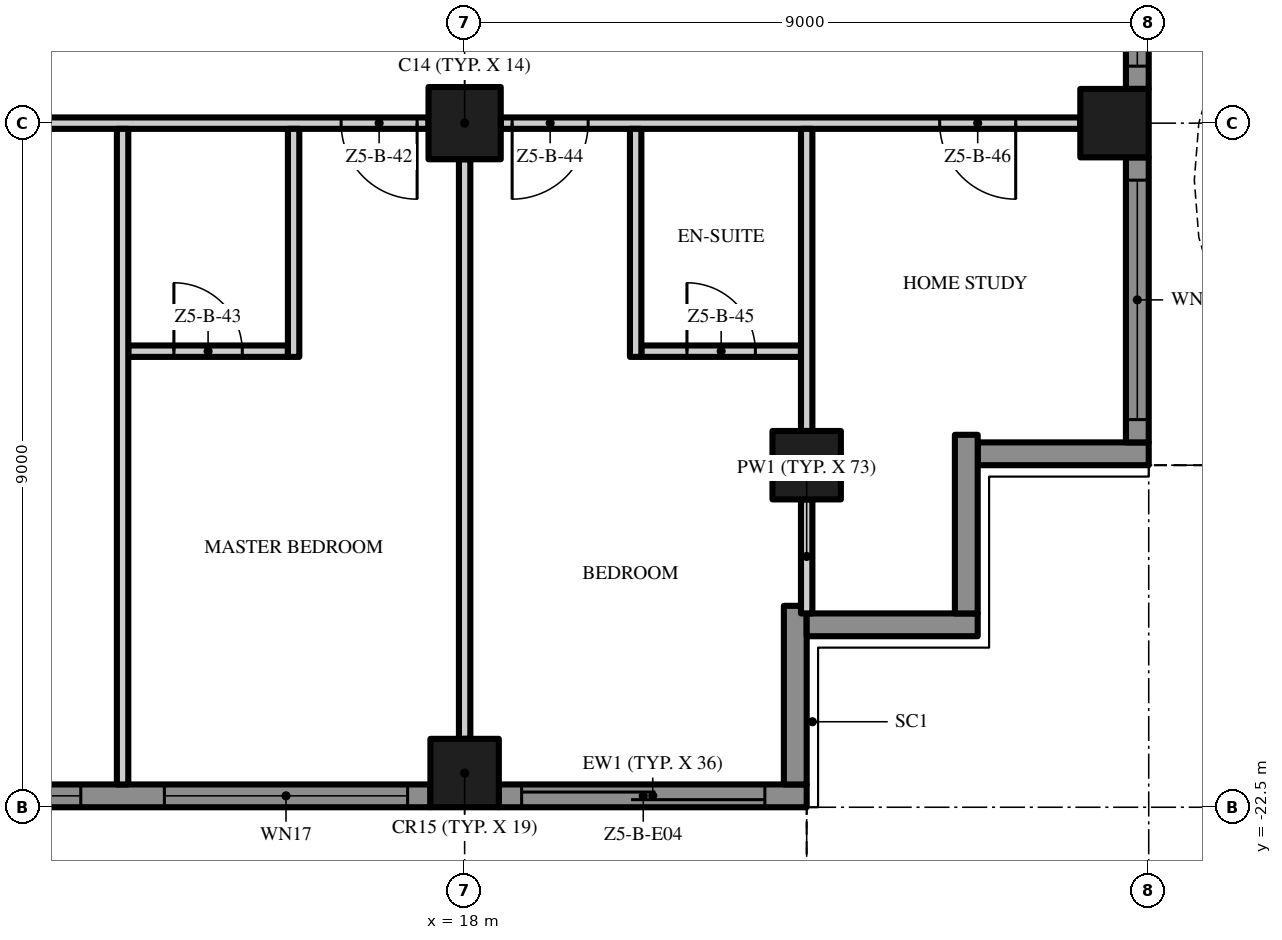
"""IFC4 building model, lengths in metres.
Left out: names, types, materials, properties, quantities, classifications, styles, units other than length and angle.
Written with IfcOpenShell. Run it as: python <this file> out.ifc"""

import sys

from ifc_helpers import new_model, si_unit, direction, frame, frame_2d, origin, origin_2d, place, context, subcontext, project, spatial, polyline, rectangle, outline, extrude, element, fill, save


model = new_model("IFC4")
c1 = context("Model", 3, precision=1e-05, world=origin(), true_north=direction((0.0, 1.0)))
c2 = subcontext(c1, "Body", "Model", "MODEL_VIEW")
j1 = project(units=[si_unit("LENGTHUNIT", "METRE"), si_unit("PLANEANGLEUNIT", "RADIAN")], contexts=[c1])
p1 = place(None, origin())
s1 = spatial("IfcSite", under=j1, at=p1, CompositionType="ELEMENT")
p2 = place(p1, origin())
s2 = spatial("IfcBuilding", under=s1, at=p2, CompositionType="ELEMENT")
p3 = place(p2, frame((0.0, 0.0, 257.8)))
s3 = spatial("IfcBuildingStorey", under=s2, at=p3, CompositionType="ELEMENT", Elevation=257.8)
p4 = place(p3, frame((18.0, -13.5, 0.0), z_axis=(0.0, 0.0, 1.0), x_axis=(1.0, 0.0, 0.0)))
e1 = element("IfcColumn", 1, at=p4, inside=s3, PredefinedType="COLUMN", context=c2, shape_type="SweptSolid", body=[
    extrude(rectangle(XDim=0.95, YDim=0.95, at=origin_2d()), origin(), (0.0, 0.0, 1.0), 3.5),
])
for number, where, z_axis, x_axis in (
    (2, (18.0, -22.05, 0.0), (0.0, 0.0, 1.0), (1.0, 0.0, 0.0)),
    (3, (26.55, -13.5, 0.0), (0.0, 0.0, 1.0), (1.0, 0.0, 0.0)),
    (4, (22.5, -18.0, 0.0), (0.0, 0.0, 1.0), (1.0, 0.0, 0.0)),
):
    element("IfcColumn", number, at=place(p3, frame(where, z_axis=z_axis, x_axis=x_axis)), inside=s3, PredefinedType="COLUMN", context=c2, shape_type="SweptSolid", body=[
        extrude(rectangle(XDim=0.9, YDim=0.9, at=origin_2d()), origin(), (0.0, 0.0, 1.0), 3.5),
    ])
p5 = place(p3, frame((17.55, -22.35, 0.0), z_axis=(0.0, 0.0, 1.0), x_axis=(-1.0, 0.0, 0.0)))
e5 = element("IfcWall", 5, at=p5, inside=s3, PredefinedType="SOLIDWALL", context=c2, shape_type="SweptSolid", body=[
    extrude(rectangle(XDim=8.1, YDim=0.3, at=frame_2d((4.05, 0.0))), origin(), (0.0, 0.0, 1.0), 3.5),
])
p6 = place(p5, frame((4.6, 0.0, 0.45)))
e6 = element("IfcOpeningElement", 6, at=p6, cuts=e5, PredefinedType="OPENING", context=c2, shape_type="SweptSolid", body=[
    extrude(rectangle(XDim=3.2, YDim=2.65, at=frame_2d((1.6, 1.325))), frame((0.0, 0.16, 0.0), z_axis=(0.0, -1.0, 0.0), x_axis=(1.0, 0.0, 0.0)), (0.0, 0.0, 1.0), 0.32),
])
p7 = place(p5, frame((0.3, 0.0, 0.45)))
e7 = element("IfcOpeningElement", 7, at=p7, cuts=e5, PredefinedType="OPENING", context=c2, shape_type="SweptSolid", body=[
    extrude(rectangle(XDim=3.2, YDim=2.65, at=frame_2d((1.6, 1.325))), frame((0.0, 0.16, 0.0), z_axis=(0.0, -1.0, 0.0), x_axis=(1.0, 0.0, 0.0)), (0.0, 0.0, 1.0), 0.32),
])
p8 = place(p3, frame((22.5, -22.35, 0.0), z_axis=(0.0, 0.0, 1.0), x_axis=(-1.0, 0.0, 0.0)))
e8 = element("IfcWall", 8, at=p8, inside=s3, PredefinedType="SOLIDWALL", context=c2, shape_type="SweptSolid", body=[
    extrude(rectangle(XDim=4.05, YDim=0.3, at=frame_2d((2.025, 0.0))), origin(), (0.0, 0.0, 1.0), 3.5),
])
p9 = place(p8, frame((0.55, 0.0, 0.0)))
e9 = element("IfcOpeningElement", 9, at=p9, cuts=e8, PredefinedType="OPENING", context=c2, shape_type="SweptSolid", body=[
    extrude(rectangle(XDim=3.2, YDim=2.4, at=frame_2d((1.6, 1.2))), frame((0.0, 0.16, 0.0), z_axis=(0.0, -1.0, 0.0), x_axis=(1.0, 0.0, 0.0)), (0.0, 0.0, 1.0), 0.32),
])
p10 = place(p3, frame((22.35, -19.85, 0.0), z_axis=(0.0, 0.0, 1.0), x_axis=(0.0, -1.0, 0.0)))
e10 = element("IfcWall", 10, at=p10, inside=s3, PredefinedType="SOLIDWALL", context=c2, shape_type="SweptSolid", body=[
    extrude(rectangle(XDim=2.35, YDim=0.3, at=frame_2d((1.175, 0.0))), origin(), (0.0, 0.0, 1.0), 3.5),
])
p11 = place(p3, frame((24.75, -20.1, 0.0), z_axis=(0.0, 0.0, 1.0), x_axis=(-1.0, 0.0, 0.0)))
e11 = element("IfcWall", 11, at=p11, inside=s3, PredefinedType="SOLIDWALL", context=c2, shape_type="SweptSolid", body=[
    extrude(rectangle(XDim=2.25, YDim=0.3, at=frame_2d((1.125, 0.0))), origin(), (0.0, 0.0, 1.0), 3.5),
])
p12 = place(p3, frame((24.6, -17.6, 0.0), z_axis=(0.0, 0.0, 1.0), x_axis=(0.0, -1.0, 0.0)))
e12 = element("IfcWall", 12, at=p12, inside=s3, PredefinedType="SOLIDWALL", context=c2, shape_type="SweptSolid", body=[
    extrude(rectangle(XDim=2.35, YDim=0.3, at=frame_2d((1.175, 0.0))), origin(), (0.0, 0.0, 1.0), 3.5),
])
p13 = place(p3, frame((27.0, -17.85, 0.0), z_axis=(0.0, 0.0, 1.0), x_axis=(-1.0, 0.0, 0.0)))
e13 = element("IfcWall", 13, at=p13, inside=s3, PredefinedType="SOLIDWALL", context=c2, shape_type="SweptSolid", body=[
    extrude(rectangle(XDim=2.25, YDim=0.3, at=frame_2d((1.125, 0.0))), origin(), (0.0, 0.0, 1.0), 3.5),
])
p14 = place(p3, frame((26.85, -13.95, 0.0), z_axis=(0.0, 0.0, 1.0), x_axis=(0.0, -1.0, 0.0)))
e14 = element("IfcWall", 14, at=p14, inside=s3, PredefinedType="SOLIDWALL", context=c2, shape_type="SweptSolid", body=[
    extrude(rectangle(XDim=3.75, YDim=0.3, at=frame_2d((1.875, 0.0))), origin(), (0.0, 0.0, 1.0), 3.5),
])
p15 = place(p14, frame((0.3, 0.0, 0.45)))
e15 = element("IfcOpeningElement", 15, at=p15, cuts=e14, PredefinedType="OPENING", context=c2, shape_type="SweptSolid", body=[
    extrude(rectangle(XDim=3.15, YDim=2.65, at=frame_2d((1.575, 1.325))), frame((0.0, 0.16, 0.0), z_axis=(0.0, -1.0, 0.0), x_axis=(1.0, 0.0, 0.0)), (0.0, 0.0, 1.0), 0.32),
])
p16 = place(p3, frame((26.85, -4.95, 0.0), z_axis=(0.0, 0.0, 1.0), x_axis=(0.0, -1.0, 0.0)))
e16 = element("IfcWall", 16, at=p16, inside=s3, PredefinedType="SOLIDWALL", context=c2, shape_type="SweptSolid", body=[
    extrude(rectangle(XDim=8.1, YDim=0.3, at=frame_2d((4.05, 0.0))), origin(), (0.0, 0.0, 1.0), 3.5),
])
p17 = place(p16, frame((4.6, 0.0, 0.45)))
e17 = element("IfcOpeningElement", 17, at=p17, cuts=e16, PredefinedType="OPENING", context=c2, shape_type="SweptSolid", body=[
    extrude(rectangle(XDim=3.2, YDim=2.65, at=frame_2d((1.6, 1.325))), frame((0.0, 0.16, 0.0), z_axis=(0.0, -1.0, 0.0), x_axis=(1.0, 0.0, 0.0)), (0.0, 0.0, 1.0), 0.32),
])
p18 = place(p16, frame((0.3, 0.0, 0.0)))
e18 = element("IfcOpeningElement", 18, at=p18, cuts=e16, PredefinedType="OPENING", context=c2, shape_type="SweptSolid", body=[
    extrude(rectangle(XDim=3.2, YDim=2.4, at=frame_2d((1.6, 1.2))), frame((0.0, 0.16, 0.0), z_axis=(0.0, -1.0, 0.0), x_axis=(1.0, 0.0, 0.0)), (0.0, 0.0, 1.0), 0.32),
])
p19 = place(p3, origin())
e19 = element("IfcWall", 19, at=p19, inside=s3, PredefinedType="USERDEFINED", context=c2, shape_type="SweptSolid", body=[
    extrude(outline(polyline([(-22.5, -24.3), (-21.0, -23.595), (-19.5, -23.159), (-18.75, -23.1), (-18.0, -23.159), (-16.5, -23.595), (-15.0, -24.3), (-13.5, -25.005), (-12.0, -25.441), (-11.25, -25.5), (-10.5, -25.441), (-9.0, -25.005), (-7.5, -24.3), (-6.0, -23.595), (-4.5, -23.159), (-3.75, -23.1), (-3.0, -23.159), (-1.5, -23.595), (0.0, -24.3), (1.5, -25.005), (3.0, -25.441), (3.75, -25.5), (4.5, -25.441), (6.0, -25.005), (7.5, -24.3), (9.0, -23.595), (10.5, -23.159), (11.25, -23.1), (12.0, -23.159), (13.5, -23.595), (15.0, -24.3), (16.5, -25.005), (18.0, -25.441), (18.75, -25.5), (19.5, -25.441), (21.0, -25.005), (22.5, -24.3), (22.394, -24.074), (20.911, -24.771), (19.455, -25.194), (18.75, -25.249), (18.045, -25.194), (16.589, -24.771), (15.106, -24.074), (13.589, -23.36), (12.045, -22.911), (11.25, -22.849), (10.455, -22.911), (8.911, -23.36), (7.394, -24.074), (5.911, -24.771), (4.455, -25.194), (3.75, -25.249), (3.045, -25.194), (1.589, -24.771), (0.106, -24.074), (-1.411, -23.36), (-2.955, -22.911), (-3.75, -22.849), (-4.545, -22.911), (-6.089, -23.36), (-7.606, -24.074), (-9.089, -24.771), (-10.545, -25.194), (-11.25, -25.249), (-11.955, -25.194), (-13.411, -24.771), (-14.894, -24.074), (-16.411, -23.36), (-17.955, -22.911), (-18.75, -22.849), (-19.545, -22.911), (-21.089, -23.36), (-22.606, -24.074), (-22.5, -24.3)])), origin(), (0.0, 0.0, 1.0), 0.9),
])
p20 = place(p3, origin())
e20 = element("IfcWall", 20, at=p20, inside=s3, PredefinedType="USERDEFINED", context=c2, shape_type="SweptSolid", body=[
    extrude(outline(polyline([(28.8, -18.0), (28.095, -16.5), (27.659, -15.0), (27.6, -14.25), (27.659, -13.5), (28.095, -12.0), (28.8, -10.5), (29.505, -9.0), (29.941, -7.5), (30.0, -6.75), (29.941, -6.0), (29.505, -4.5), (28.8, -3.0), (28.095, -1.5), (27.659, 0.0), (27.6, 0.75), (27.659, 1.5), (28.095, 3.0), (28.8, 4.5), (29.505, 6.0), (29.941, 7.5), (30.0, 8.25), (29.941, 9.0), (29.505, 10.5), (28.8, 12.0), (28.095, 13.5), (27.659, 15.0), (27.6, 15.75), (27.659, 16.5), (28.095, 18.0), (27.855, 18.07), (27.411, 16.545), (27.349, 15.75), (27.411, 14.955), (27.86, 13.411), (28.574, 11.894), (29.271, 10.411), (29.694, 8.955), (29.749, 8.25), (29.694, 7.545), (29.271, 6.089), (28.574, 4.606), (27.86, 3.089), (27.411, 1.545), (27.349, 0.75), (27.411, -0.045), (27.86, -1.589), (28.574, -3.106), (29.271, -4.589), (29.694, -6.045), (29.749, -6.75), (29.694, -7.455), (29.271, -8.911), (28.574, -10.394), (27.86, -11.911), (27.411, -13.455), (27.349, -14.25), (27.411, -15.045), (27.86, -16.589), (28.574, -18.106), (28.8, -18.0)])), origin(), (0.0, 0.0, 1.0), 0.9),
])
p21 = place(p3, frame((13.575, -16.5, 0.0), z_axis=(0.0, 0.0, 1.0), x_axis=(1.0, 0.0, 0.0)))
e21 = element("IfcWall", 21, at=p21, inside=s3, PredefinedType="PARTITIONING", context=c2, shape_type="SweptSolid", body=[
    extrude(rectangle(XDim=2.1, YDim=0.15, at=frame_2d((1.05, 0.0))), origin(), (0.0, 0.0, 1.0), 3.5),
])
p22 = place(p21, frame((0.6, 0.0, 0.0)))
e22 = element("IfcOpeningElement", 22, at=p22, cuts=e21, PredefinedType="OPENING", context=c2, shape_type="SweptSolid", body=[
    extrude(rectangle(XDim=0.9, YDim=2.1, at=frame_2d((0.45, 1.05))), frame((0.0, 0.085, 0.0), z_axis=(0.0, -1.0, 0.0), x_axis=(1.0, 0.0, 0.0)), (0.0, 0.0, 1.0), 0.17),
])
p23 = place(p3, frame((20.325, -16.5, 0.0), z_axis=(0.0, 0.0, 1.0), x_axis=(1.0, 0.0, 0.0)))
e23 = element("IfcWall", 23, at=p23, inside=s3, PredefinedType="PARTITIONING", context=c2, shape_type="SweptSolid", body=[
    extrude(rectangle(XDim=2.1, YDim=0.15, at=frame_2d((1.05, 0.0))), origin(), (0.0, 0.0, 1.0), 3.5),
])
p24 = place(p23, frame((0.6, 0.0, 0.0)))
e24 = element("IfcOpeningElement", 24, at=p24, cuts=e23, PredefinedType="OPENING", context=c2, shape_type="SweptSolid", body=[
    extrude(rectangle(XDim=0.9, YDim=2.1, at=frame_2d((0.45, 1.05))), frame((0.0, 0.085, 0.0), z_axis=(0.0, -1.0, 0.0), x_axis=(1.0, 0.0, 0.0)), (0.0, 0.0, 1.0), 0.17),
])
p25 = place(p3, frame((17.525, -13.5, 0.0), z_axis=(0.0, 0.0, 1.0), x_axis=(-1.0, 0.0, 0.0)))
e25 = element("IfcWall", 25, at=p25, inside=s3, PredefinedType="PARTITIONING", context=c2, shape_type="SweptSolid", body=[
    extrude(rectangle(XDim=8.05, YDim=0.15, at=frame_2d((4.025, 0.0))), origin(), (0.0, 0.0, 1.0), 3.5),
])
p26 = place(p25, frame((6.1, 0.0, 0.0)))
e26 = element("IfcOpeningElement", 26, at=p26, cuts=e25, PredefinedType="OPENING", context=c2, shape_type="SweptSolid", body=[
    extrude(rectangle(XDim=1.8, YDim=2.4, at=frame_2d((0.9, 1.2))), frame((0.0, 0.085, 0.0), z_axis=(0.0, -1.0, 0.0), x_axis=(1.0, 0.0, 0.0)), (0.0, 0.0, 1.0), 0.17),
])
p27 = place(p25, frame((0.15, 0.0, 0.0)))
e27 = element("IfcOpeningElement", 27, at=p27, cuts=e25, PredefinedType="OPENING", context=c2, shape_type="SweptSolid", body=[
    extrude(rectangle(XDim=1.0, YDim=2.4, at=frame_2d((0.5, 1.2))), frame((0.0, 0.085, 0.0), z_axis=(0.0, -1.0, 0.0), x_axis=(1.0, 0.0, 0.0)), (0.0, 0.0, 1.0), 0.17),
])
p28 = place(p3, frame((26.1, -13.5, 0.0), z_axis=(0.0, 0.0, 1.0), x_axis=(-1.0, 0.0, 0.0)))
e28 = element("IfcWall", 28, at=p28, inside=s3, PredefinedType="PARTITIONING", context=c2, shape_type="SweptSolid", body=[
    extrude(rectangle(XDim=7.625, YDim=0.15, at=frame_2d((3.812, 0.0))), origin(), (0.0, 0.0, 1.0), 3.5),
])
p29 = place(p28, frame((6.475, 0.0, 0.0)))
e29 = element("IfcOpeningElement", 29, at=p29, cuts=e28, PredefinedType="OPENING", context=c2, shape_type="SweptSolid", body=[
    extrude(rectangle(XDim=1.0, YDim=2.4, at=frame_2d((0.5, 1.2))), frame((0.0, 0.085, 0.0), z_axis=(0.0, -1.0, 0.0), x_axis=(1.0, 0.0, 0.0)), (0.0, 0.0, 1.0), 0.17),
])
p30 = place(p28, frame((0.85, 0.0, 0.0)))
e30 = element("IfcOpeningElement", 30, at=p30, cuts=e28, PredefinedType="OPENING", context=c2, shape_type="SweptSolid", body=[
    extrude(rectangle(XDim=1.0, YDim=2.4, at=frame_2d((0.5, 1.2))), frame((0.0, 0.085, 0.0), z_axis=(0.0, -1.0, 0.0), x_axis=(1.0, 0.0, 0.0)), (0.0, 0.0, 1.0), 0.17),
])
p31 = place(p3, frame((13.5, -22.2, 0.0), z_axis=(0.0, 0.0, 1.0), x_axis=(0.0, 1.0, 0.0)))
e31 = element("IfcWall", 31, at=p31, inside=s3, PredefinedType="PARTITIONING", context=c2, shape_type="SweptSolid", body=[
    extrude(rectangle(XDim=8.625, YDim=0.15, at=frame_2d((4.312, 0.0))), origin(), (0.0, 0.0, 1.0), 3.5),
])
p32 = place(p3, frame((15.75, -16.575, 0.0), z_axis=(0.0, 0.0, 1.0), x_axis=(0.0, 1.0, 0.0)))
e32 = element("IfcWall", 32, at=p32, inside=s3, PredefinedType="PARTITIONING", context=c2, shape_type="SweptSolid", body=[
    extrude(rectangle(XDim=3.0, YDim=0.15, at=frame_2d((1.5, 0.0))), origin(), (0.0, 0.0, 1.0), 3.5),
])
p33 = place(p3, frame((18.0, -21.6, 0.0), z_axis=(0.0, 0.0, 1.0), x_axis=(0.0, 1.0, 0.0)))
e33 = element("IfcWall", 33, at=p33, inside=s3, PredefinedType="PARTITIONING", context=c2, shape_type="SweptSolid", body=[
    extrude(rectangle(XDim=7.625, YDim=0.15, at=frame_2d((3.812, 0.0))), origin(), (0.0, 0.0, 1.0), 3.5),
])
p34 = place(p3, frame((20.25, -16.575, 0.0), z_axis=(0.0, 0.0, 1.0), x_axis=(0.0, 1.0, 0.0)))
e34 = element("IfcWall", 34, at=p34, inside=s3, PredefinedType="PARTITIONING", context=c2, shape_type="SweptSolid", body=[
    extrude(rectangle(XDim=3.0, YDim=0.15, at=frame_2d((1.5, 0.0))), origin(), (0.0, 0.0, 1.0), 3.5),
])
p35 = place(p3, frame((22.5, -19.95, 0.0), z_axis=(0.0, 0.0, 1.0), x_axis=(0.0, 1.0, 0.0)))
e35 = element("IfcWall", 35, at=p35, inside=s3, PredefinedType="PARTITIONING", context=c2, shape_type="SweptSolid", body=[
    extrude(rectangle(XDim=1.5, YDim=0.15, at=frame_2d((0.75, 0.0))), origin(), (0.0, 0.0, 1.0), 3.5),
])
p36 = place(p3, frame((22.5, -17.55, 0.0), z_axis=(0.0, 0.0, 1.0), x_axis=(0.0, 1.0, 0.0)))
e36 = element("IfcWall", 36, at=p36, inside=s3, PredefinedType="PARTITIONING", context=c2, shape_type="SweptSolid", body=[
    extrude(rectangle(XDim=3.975, YDim=0.15, at=frame_2d((1.988, 0.0))), origin(), (0.0, 0.0, 1.0), 3.5),
])
p37 = place(p6, origin())
e37 = element("IfcWindow", 37, at=p37, inside=s3, PartitioningType="SINGLE_PANEL", PredefinedType="WINDOW", context=c2, shape_type="SweptSolid", body=[
    extrude(rectangle(XDim=3.2, YDim=2.65, at=frame_2d((1.6, 1.325))), frame((0.0, 0.03, 0.0), z_axis=(0.0, -1.0, 0.0), x_axis=(1.0, 0.0, 0.0)), (0.0, 0.0, 1.0), 0.06),
])
fill(e6, e37)
p38 = place(p7, origin())
e38 = element("IfcWindow", 38, at=p38, inside=s3, PartitioningType="SINGLE_PANEL", PredefinedType="WINDOW", context=c2, shape_type="SweptSolid", body=[
    extrude(rectangle(XDim=3.2, YDim=2.65, at=frame_2d((1.6, 1.325))), frame((0.0, 0.03, 0.0), z_axis=(0.0, -1.0, 0.0), x_axis=(1.0, 0.0, 0.0)), (0.0, 0.0, 1.0), 0.06),
])
fill(e7, e38)
p39 = place(p9, origin())
e39 = element("IfcDoor", 39, at=p39, inside=s3, OperationType="SINGLE_SWING_LEFT", PredefinedType="DOOR", context=c2, shape_type="SweptSolid", body=[
    extrude(rectangle(XDim=3.2, YDim=2.4, at=frame_2d((1.6, 1.2))), frame((0.0, 0.025, 0.0), z_axis=(0.0, -1.0, 0.0), x_axis=(1.0, 0.0, 0.0)), (0.0, 0.0, 1.0), 0.05),
])
fill(e9, e39)
p40 = place(p15, origin())
e40 = element("IfcWindow", 40, at=p40, inside=s3, PartitioningType="SINGLE_PANEL", PredefinedType="WINDOW", context=c2, shape_type="SweptSolid", body=[
    extrude(rectangle(XDim=3.15, YDim=2.65, at=frame_2d((1.575, 1.325))), frame((0.0, 0.03, 0.0), z_axis=(0.0, -1.0, 0.0), x_axis=(1.0, 0.0, 0.0)), (0.0, 0.0, 1.0), 0.06),
])
fill(e15, e40)
p41 = place(p17, origin())
e41 = element("IfcWindow", 41, at=p41, inside=s3, PartitioningType="SINGLE_PANEL", PredefinedType="WINDOW", context=c2, shape_type="SweptSolid", body=[
    extrude(rectangle(XDim=3.2, YDim=2.65, at=frame_2d((1.6, 1.325))), frame((0.0, 0.03, 0.0), z_axis=(0.0, -1.0, 0.0), x_axis=(1.0, 0.0, 0.0)), (0.0, 0.0, 1.0), 0.06),
])
fill(e17, e41)
p42 = place(p27, origin())
e42 = element("IfcDoor", 42, at=p42, inside=s3, OperationType="SINGLE_SWING_LEFT", PredefinedType="DOOR", context=c2, shape_type="SweptSolid", body=[
    extrude(rectangle(XDim=1.0, YDim=2.4, at=frame_2d((0.5, 1.2))), frame((0.0, 0.025, 0.0), z_axis=(0.0, -1.0, 0.0), x_axis=(1.0, 0.0, 0.0)), (0.0, 0.0, 1.0), 0.05),
])
fill(e27, e42)
p43 = place(p22, origin())
e43 = element("IfcDoor", 43, at=p43, inside=s3, OperationType="SINGLE_SWING_LEFT", PredefinedType="DOOR", context=c2, shape_type="SweptSolid", body=[
    extrude(rectangle(XDim=0.9, YDim=2.1, at=frame_2d((0.45, 1.05))), frame((0.0, 0.025, 0.0), z_axis=(0.0, -1.0, 0.0), x_axis=(1.0, 0.0, 0.0)), (0.0, 0.0, 1.0), 0.05),
])
fill(e22, e43)
p44 = place(p29, origin())
e44 = element("IfcDoor", 44, at=p44, inside=s3, OperationType="SINGLE_SWING_RIGHT", PredefinedType="DOOR", context=c2, shape_type="SweptSolid", body=[
    extrude(rectangle(XDim=1.0, YDim=2.4, at=frame_2d((0.5, 1.2))), frame((0.0, 0.025, 0.0), z_axis=(0.0, -1.0, 0.0), x_axis=(1.0, 0.0, 0.0)), (0.0, 0.0, 1.0), 0.05),
])
fill(e29, e44)
p45 = place(p24, origin())
e45 = element("IfcDoor", 45, at=p45, inside=s3, OperationType="SINGLE_SWING_LEFT", PredefinedType="DOOR", context=c2, shape_type="SweptSolid", body=[
    extrude(rectangle(XDim=0.9, YDim=2.1, at=frame_2d((0.45, 1.05))), frame((0.0, 0.025, 0.0), z_axis=(0.0, -1.0, 0.0), x_axis=(1.0, 0.0, 0.0)), (0.0, 0.0, 1.0), 0.05),
])
fill(e24, e45)
p46 = place(p30, origin())
e46 = element("IfcDoor", 46, at=p46, inside=s3, OperationType="SINGLE_SWING_LEFT", PredefinedType="DOOR", context=c2, shape_type="SweptSolid", body=[
    extrude(rectangle(XDim=1.0, YDim=2.4, at=frame_2d((0.5, 1.2))), frame((0.0, 0.025, 0.0), z_axis=(0.0, -1.0, 0.0), x_axis=(1.0, 0.0, 0.0)), (0.0, 0.0, 1.0), 0.05),
])
fill(e30, e46)
save(model, sys.argv[1])
